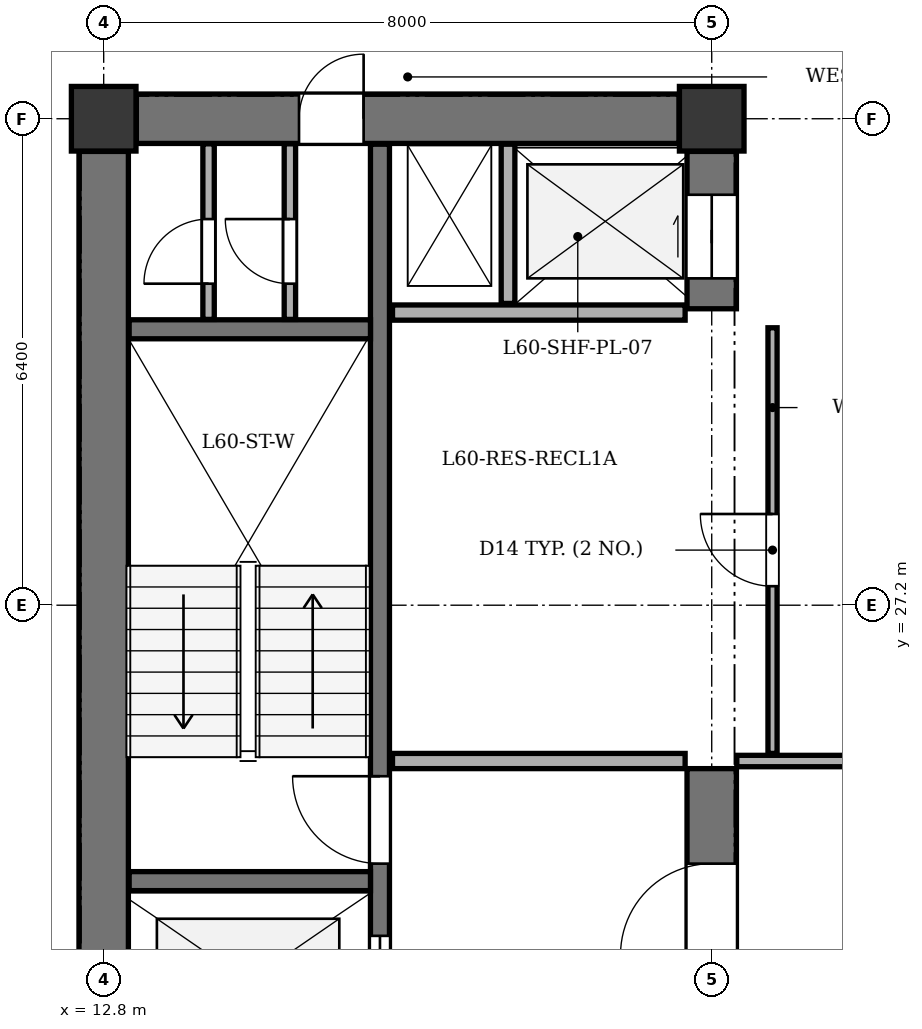
"""IFC4 building model, lengths in metres.
Left out: names, types, materials, properties, quantities, classifications, styles, units other than length and angle.
Written with IfcOpenShell. Run it as: python <this file> out.ifc"""

import sys

from ifc_helpers import new_model, si_unit, direction, frame, frame_2d, origin, origin_2d, place, context, subcontext, project, spatial, rectangle, extrude, element, fill, save


model = new_model("IFC4")
c1 = context("Model", 3, precision=1e-05, world=origin(), true_north=direction((0.0, 1.0)))
c2 = subcontext(c1, "Body", "Model", "MODEL_VIEW")
j1 = project(units=[si_unit("LENGTHUNIT", "METRE"), si_unit("PLANEANGLEUNIT", "RADIAN")], contexts=[c1])
p1 = place(None, origin())
s1 = spatial("IfcSite", under=j1, at=p1, CompositionType="ELEMENT")
p2 = place(p1, origin())
s2 = spatial("IfcBuilding", under=s1, at=p2, CompositionType="ELEMENT")
p3 = place(p2, frame((0.0, 0.0, 231.3)))
s3 = spatial("IfcBuildingStorey", under=s2, at=p3, CompositionType="ELEMENT", Elevation=231.3)
for number, where, z_axis, x_axis in (
    (1, (12.8, 33.6, 0.0), (0.0, 0.0, 1.0), (1.0, 0.0, 0.0)),
    (2, (20.8, 33.6, 0.0), (0.0, 0.0, 1.0), (1.0, 0.0, 0.0)),
):
    element("IfcColumn", number, at=place(p3, frame(where, z_axis=z_axis, x_axis=x_axis)), inside=s3, PredefinedType="COLUMN", context=c2, shape_type="SweptSolid", body=[
        extrude(rectangle(XDim=0.85, YDim=0.85, at=origin_2d()), origin(), (0.0, 0.0, 1.0), 3.4),
    ])
p4 = place(p3, frame((12.8, 21.23, 0.0), z_axis=(0.0, 0.0, 1.0), x_axis=(0.0, 1.0, 0.0)))
e3 = element("IfcWall", 3, at=p4, inside=s3, PredefinedType="SHEAR", context=c2, shape_type="SweptSolid", body=[
    extrude(rectangle(XDim=11.94, YDim=0.65, at=frame_2d((5.97, 0.0))), origin(), (0.0, 0.0, 1.0), 3.1),
])
p5 = place(p3, frame((13.23, 33.6, 0.0), z_axis=(0.0, 0.0, 1.0), x_axis=(1.0, 0.0, 0.0)))
e4 = element("IfcWall", 4, at=p5, inside=s3, PredefinedType="SHEAR", context=c2, shape_type="SweptSolid", body=[
    extrude(rectangle(XDim=7.14, YDim=0.65, at=frame_2d((3.57, 0.0))), origin(), (0.0, 0.0, 1.0), 3.1),
])
p6 = place(p5, frame((2.14, 0.0, 0.0)))
e5 = element("IfcOpeningElement", 5, at=p6, cuts=e4, PredefinedType="OPENING", context=c2, shape_type="SweptSolid", body=[
    extrude(rectangle(XDim=0.85, YDim=2.02, at=frame_2d((0.425, 1.01))), frame((0.0, 0.335, 0.0), z_axis=(0.0, -1.0, 0.0), x_axis=(1.0, 0.0, 0.0)), (0.0, 0.0, 1.0), 0.67),
])
p7 = place(p3, frame((20.8, 21.23, 0.0), z_axis=(0.0, 0.0, 1.0), x_axis=(0.0, 1.0, 0.0)))
e6 = element("IfcWall", 6, at=p7, inside=s3, PredefinedType="SHEAR", context=c2, shape_type="SweptSolid", body=[
    extrude(rectangle(XDim=3.82, YDim=0.65, at=frame_2d((1.91, 0.0))), origin(), (0.0, 0.0, 1.0), 3.1),
])
p8 = place(p7, frame((1.37, 0.0, 0.0)))
e7 = element("IfcOpeningElement", 7, at=p8, cuts=e6, PredefinedType="OPENING", context=c2, shape_type="SweptSolid", body=[
    extrude(rectangle(XDim=1.2, YDim=2.15, at=frame_2d((0.6, 1.075))), frame((0.0, 0.335, 0.0), z_axis=(0.0, -1.0, 0.0), x_axis=(1.0, 0.0, 0.0)), (0.0, 0.0, 1.0), 0.67),
])
p9 = place(p3, frame((20.8, 31.1, 0.0), z_axis=(0.0, 0.0, 1.0), x_axis=(0.0, 1.0, 0.0)))
e8 = element("IfcWall", 8, at=p9, inside=s3, PredefinedType="SHEAR", context=c2, shape_type="SweptSolid", body=[
    extrude(rectangle(XDim=2.07, YDim=0.65, at=frame_2d((1.035, 0.0))), origin(), (0.0, 0.0, 1.0), 3.1),
])
p10 = place(p9, frame((0.4, 0.0, 0.0)))
e9 = element("IfcOpeningElement", 9, at=p10, cuts=e8, PredefinedType="OPENING", context=c2, shape_type="SweptSolid", body=[
    extrude(rectangle(XDim=1.1, YDim=2.1, at=frame_2d((0.55, 1.05))), frame((0.0, 0.335, 0.0), z_axis=(0.0, -1.0, 0.0), x_axis=(1.0, 0.0, 0.0)), (0.0, 0.0, 1.0), 0.67),
])
p11 = place(p3, frame((16.435, 21.135, 0.0), z_axis=(0.0, 0.0, 1.0), x_axis=(0.0, 1.0, 0.0)))
e10 = element("IfcWall", 10, at=p11, inside=s3, PredefinedType="SHEAR", context=c2, shape_type="SweptSolid", body=[
    extrude(rectangle(XDim=12.13, YDim=0.25, at=frame_2d((6.065, 0.0))), origin(), (0.0, 0.0, 1.0), 3.1),
])
p12 = place(p11, frame((0.515, 0.0, 0.0)))
e11 = element("IfcOpeningElement", 11, at=p12, cuts=e10, PredefinedType="OPENING", context=c2, shape_type="SweptSolid", body=[
    extrude(rectangle(XDim=1.2, YDim=2.15, at=frame_2d((0.6, 1.075))), frame((0.0, 0.135, 0.0), z_axis=(0.0, -1.0, 0.0), x_axis=(1.0, 0.0, 0.0)), (0.0, 0.0, 1.0), 0.27),
])
p13 = place(p11, frame((2.665, 0.0, 0.0)))
e12 = element("IfcOpeningElement", 12, at=p13, cuts=e10, PredefinedType="OPENING", context=c2, shape_type="SweptSolid", body=[
    extrude(rectangle(XDim=1.15, YDim=2.15, at=frame_2d((0.575, 1.075))), frame((0.0, 0.135, 0.0), z_axis=(0.0, -1.0, 0.0), x_axis=(1.0, 0.0, 0.0)), (0.0, 0.0, 1.0), 0.27),
])
for number, where, z_axis, x_axis in (
    (13, (13.135, 23.57, 0.0), (0.0, 0.0, 1.0), (1.0, 0.0, 0.0)),
    (14, (13.135, 30.83, 0.0), (0.0, 0.0, 1.0), (1.0, 0.0, 0.0)),
):
    element("IfcWall", number, at=place(p3, frame(where, z_axis=z_axis, x_axis=x_axis)), inside=s3, PredefinedType="SHEAR", context=c2, shape_type="SweptSolid", body=[
        extrude(rectangle(XDim=3.175, YDim=0.25, at=frame_2d((1.587, 0.0))), origin(), (0.0, 0.0, 1.0), 3.1),
    ])
for number, where, z_axis, x_axis in (
    (15, (16.6, 25.15, 0.0), (0.0, 0.0, 1.0), (1.0, 0.0, 0.0)),
    (16, (16.6, 31.05, 0.0), (0.0, 0.0, 1.0), (1.0, 0.0, 0.0)),
):
    element("IfcWall", number, at=place(p3, frame(where, z_axis=z_axis, x_axis=x_axis)), inside=s3, PredefinedType="SOLIDWALL", context=c2, shape_type="SweptSolid", body=[
        extrude(rectangle(XDim=3.85, YDim=0.2, at=frame_2d((1.925, 0.0))), origin(), (0.0, 0.0, 1.0), 3.1),
    ])
p14 = place(p3, frame((18.12, 31.17, 0.0), z_axis=(0.0, 0.0, 1.0), x_axis=(0.0, 1.0, 0.0)))
e17 = element("IfcWall", 17, at=p14, inside=s3, PredefinedType="PARTITIONING", context=c2, shape_type="SweptSolid", body=[
    extrude(rectangle(XDim=2.095, YDim=0.18, at=frame_2d((1.047, 0.0))), origin(), (0.0, 0.0, 1.0), 3.1),
])
p15 = place(p3, frame((14.18, 30.96, 0.0), z_axis=(0.0, 0.0, 1.0), x_axis=(0.0, 1.0, 0.0)))
e18 = element("IfcWall", 18, at=p15, inside=s3, PredefinedType="PARTITIONING", context=c2, shape_type="SweptSolid", body=[
    extrude(rectangle(XDim=2.31, YDim=0.15, at=frame_2d((1.155, 0.0))), origin(), (0.0, 0.0, 1.0), 3.1),
])
p16 = place(p15, frame((0.47, 0.0, 0.0)))
e19 = element("IfcOpeningElement", 19, at=p16, cuts=e18, PredefinedType="OPENING", context=c2, shape_type="SweptSolid", body=[
    extrude(rectangle(XDim=0.85, YDim=2.02, at=frame_2d((0.425, 1.01))), frame((0.0, 0.085, 0.0), z_axis=(0.0, -1.0, 0.0), x_axis=(1.0, 0.0, 0.0)), (0.0, 0.0, 1.0), 0.17),
])
p17 = place(p3, frame((15.25, 30.96, 0.0), z_axis=(0.0, 0.0, 1.0), x_axis=(0.0, 1.0, 0.0)))
e20 = element("IfcWall", 20, at=p17, inside=s3, PredefinedType="PARTITIONING", context=c2, shape_type="SweptSolid", body=[
    extrude(rectangle(XDim=2.31, YDim=0.15, at=frame_2d((1.155, 0.0))), origin(), (0.0, 0.0, 1.0), 3.1),
])
p18 = place(p17, frame((0.47, 0.0, 0.0)))
e21 = element("IfcOpeningElement", 21, at=p18, cuts=e20, PredefinedType="OPENING", context=c2, shape_type="SweptSolid", body=[
    extrude(rectangle(XDim=0.85, YDim=2.02, at=frame_2d((0.425, 1.01))), frame((0.0, 0.085, 0.0), z_axis=(0.0, -1.0, 0.0), x_axis=(1.0, 0.0, 0.0)), (0.0, 0.0, 1.0), 0.17),
])
p19 = place(p3, frame((21.13, 25.15, 0.0), z_axis=(0.0, 0.0, 1.0), x_axis=(1.0, 0.0, 0.0)))
e22 = element("IfcWall", 22, at=p19, inside=s3, PredefinedType="PARTITIONING", context=c2, shape_type="SweptSolid", body=[
    extrude(rectangle(XDim=5.52, YDim=0.15, at=frame_2d((2.76, 0.0))), origin(), (0.0, 0.0, 1.0), 3.1),
])
p20 = place(p3, frame((21.6, 25.25, 0.0), z_axis=(0.0, 0.0, 1.0), x_axis=(0.0, 1.0, 0.0)))
e23 = element("IfcWall", 23, at=p20, inside=s3, PredefinedType="PARTITIONING", context=c2, shape_type="SweptSolid", body=[
    extrude(rectangle(XDim=5.6, YDim=0.12, at=frame_2d((2.8, 0.0))), origin(), (0.0, 0.0, 1.0), 3.1),
])
p21 = place(p20, frame((2.2, 0.0, 0.0)))
e24 = element("IfcOpeningElement", 24, at=p21, cuts=e23, PredefinedType="OPENING", context=c2, shape_type="SweptSolid", body=[
    extrude(rectangle(XDim=0.95, YDim=2.1, at=frame_2d((0.475, 1.05))), frame((0.0, 0.07, 0.0), z_axis=(0.0, -1.0, 0.0), x_axis=(1.0, 0.0, 0.0)), (0.0, 0.0, 1.0), 0.14),
])
p22 = place(p6, origin())
e25 = element("IfcDoor", 25, at=p22, inside=s3, OperationType="SINGLE_SWING_RIGHT", PredefinedType="DOOR", context=c2, shape_type="SweptSolid", body=[
    extrude(rectangle(XDim=0.85, YDim=2.02, at=frame_2d((0.425, 1.01))), frame((0.0, 0.025, 0.0), z_axis=(0.0, -1.0, 0.0), x_axis=(1.0, 0.0, 0.0)), (0.0, 0.0, 1.0), 0.05),
])
fill(e5, e25)
p23 = place(p8, origin())
e26 = element("IfcDoor", 26, at=p23, inside=s3, OperationType="SINGLE_SWING_LEFT", PredefinedType="DOOR", context=c2, shape_type="SweptSolid", body=[
    extrude(rectangle(XDim=1.2, YDim=2.15, at=frame_2d((0.6, 1.075))), frame((0.0, 0.025, 0.0), z_axis=(0.0, -1.0, 0.0), x_axis=(1.0, 0.0, 0.0)), (0.0, 0.0, 1.0), 0.05),
])
fill(e7, e26)
p24 = place(p10, origin())
e27 = element("IfcDoor", 27, at=p24, inside=s3, OperationType="DOUBLE_DOOR_SLIDING", PredefinedType="DOOR", context=c2, shape_type="SweptSolid", body=[
    extrude(rectangle(XDim=1.1, YDim=2.1, at=frame_2d((0.55, 1.05))), frame((0.0, 0.025, 0.0), z_axis=(0.0, -1.0, 0.0), x_axis=(1.0, 0.0, 0.0)), (0.0, 0.0, 1.0), 0.05),
])
fill(e9, e27)
p25 = place(p12, origin())
e28 = element("IfcDoor", 28, at=p25, inside=s3, OperationType="DOUBLE_DOOR_SLIDING", PredefinedType="DOOR", context=c2, shape_type="SweptSolid", body=[
    extrude(rectangle(XDim=1.2, YDim=2.15, at=frame_2d((0.6, 1.075))), frame((0.0, 0.025, 0.0), z_axis=(0.0, -1.0, 0.0), x_axis=(1.0, 0.0, 0.0)), (0.0, 0.0, 1.0), 0.05),
])
fill(e11, e28)
p26 = place(p13, origin())
e29 = element("IfcDoor", 29, at=p26, inside=s3, OperationType="SINGLE_SWING_RIGHT", PredefinedType="DOOR", context=c2, shape_type="SweptSolid", body=[
    extrude(rectangle(XDim=1.15, YDim=2.15, at=frame_2d((0.575, 1.075))), frame((0.0, 0.025, 0.0), z_axis=(0.0, -1.0, 0.0), x_axis=(1.0, 0.0, 0.0)), (0.0, 0.0, 1.0), 0.05),
])
fill(e12, e29)
p27 = place(p16, origin())
e30 = element("IfcDoor", 30, at=p27, inside=s3, OperationType="SINGLE_SWING_LEFT", PredefinedType="DOOR", context=c2, shape_type="SweptSolid", body=[
    extrude(rectangle(XDim=0.85, YDim=2.02, at=frame_2d((0.425, 1.01))), frame((0.0, 0.025, 0.0), z_axis=(0.0, -1.0, 0.0), x_axis=(1.0, 0.0, 0.0)), (0.0, 0.0, 1.0), 0.05),
])
fill(e19, e30)
p28 = place(p18, origin())
e31 = element("IfcDoor", 31, at=p28, inside=s3, OperationType="SINGLE_SWING_RIGHT", PredefinedType="DOOR", context=c2, shape_type="SweptSolid", body=[
    extrude(rectangle(XDim=0.85, YDim=2.02, at=frame_2d((0.425, 1.01))), frame((0.0, 0.025, 0.0), z_axis=(0.0, -1.0, 0.0), x_axis=(1.0, 0.0, 0.0)), (0.0, 0.0, 1.0), 0.05),
])
fill(e21, e31)
p29 = place(p21, origin())
e32 = element("IfcDoor", 32, at=p29, inside=s3, OperationType="SINGLE_SWING_RIGHT", PredefinedType="DOOR", context=c2, shape_type="SweptSolid", body=[
    extrude(rectangle(XDim=0.95, YDim=2.1, at=frame_2d((0.475, 1.05))), frame((0.0, 0.025, 0.0), z_axis=(0.0, -1.0, 0.0), x_axis=(1.0, 0.0, 0.0)), (0.0, 0.0, 1.0), 0.05),
])
fill(e24, e32)
save(model, sys.argv[1])
